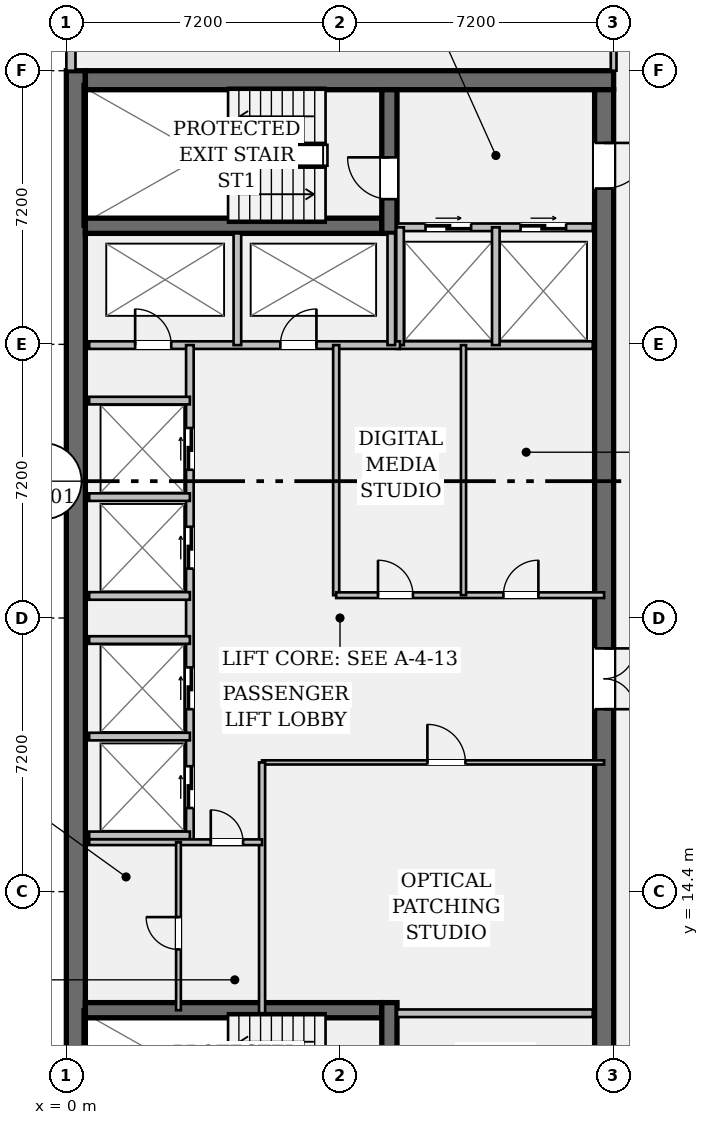
"""IFC4 building model, lengths in metres.
Left out: names, types, materials, properties, quantities, classifications, styles, units other than length and angle.
Written with IfcOpenShell. Run it as: python <this file> out.ifc"""

import sys

from ifc_helpers import new_model, si_unit, direction, frame, frame_2d, origin, place, context, subcontext, project, spatial, rectangle, extrude, element, fill, save


model = new_model("IFC4")
c1 = context("Model", 3, precision=1e-05, world=origin(), true_north=direction((0.0, 1.0)))
c2 = subcontext(c1, "Body", "Model", "MODEL_VIEW")
j1 = project(units=[si_unit("LENGTHUNIT", "METRE"), si_unit("PLANEANGLEUNIT", "RADIAN")], contexts=[c1])
p1 = place(None, origin())
s1 = spatial("IfcSite", under=j1, at=p1, CompositionType="ELEMENT")
p2 = place(p1, origin())
s2 = spatial("IfcBuilding", under=s1, at=p2, CompositionType="ELEMENT")
p3 = place(p2, frame((0.0, 0.0, 272.65)))
s3 = spatial("IfcBuildingStorey", under=s2, at=p3, CompositionType="ELEMENT", Elevation=272.65)
p4 = place(p3, frame((0.25, 7.2, 0.0), z_axis=(0.0, 0.0, 1.0), x_axis=(0.0, 1.0, 0.0)))
e1 = element("IfcWall", 1, at=p4, inside=s3, PredefinedType="SHEAR", context=c2, shape_type="SweptSolid", body=[
    extrude(rectangle(XDim=28.8, YDim=0.5, at=frame_2d((14.4, 0.0))), origin(), (0.0, 0.0, 1.0), 3.24),
])
p5 = place(p3, frame((0.5, 35.75, 0.0), z_axis=(0.0, 0.0, 1.0), x_axis=(1.0, 0.0, 0.0)))
e2 = element("IfcWall", 2, at=p5, inside=s3, PredefinedType="SHEAR", context=c2, shape_type="SweptSolid", body=[
    extrude(rectangle(XDim=13.9, YDim=0.5, at=frame_2d((6.95, 0.0))), origin(), (0.0, 0.0, 1.0), 3.24),
])
p6 = place(p3, frame((14.15, 35.5, 0.0), z_axis=(0.0, 0.0, 1.0), x_axis=(0.0, -1.0, 0.0)))
e3 = element("IfcWall", 3, at=p6, inside=s3, PredefinedType="SHEAR", context=c2, shape_type="SweptSolid", body=[
    extrude(rectangle(XDim=27.8, YDim=0.5, at=frame_2d((13.9, 0.0))), origin(), (0.0, 0.0, 1.0), 3.24),
])
p7 = place(p6, frame((1.4, 0.0, 0.0)))
e4 = element("IfcOpeningElement", 4, at=p7, cuts=e3, PredefinedType="OPENING", context=c2, shape_type="SweptSolid", body=[
    extrude(rectangle(XDim=1.2, YDim=2.15, at=frame_2d((0.6, 1.075))), frame((0.0, 0.262, 0.0), z_axis=(0.0, -1.0, 0.0), x_axis=(1.0, 0.0, 0.0)), (0.0, 0.0, 1.0), 0.524),
])
p8 = place(p6, frame((25.35, 0.0, 0.0)))
e5 = element("IfcOpeningElement", 5, at=p8, cuts=e3, PredefinedType="OPENING", context=c2, shape_type="SweptSolid", body=[
    extrude(rectangle(XDim=1.2, YDim=2.15, at=frame_2d((0.6, 1.075))), frame((0.0, 0.262, 0.0), z_axis=(0.0, -1.0, 0.0), x_axis=(1.0, 0.0, 0.0)), (0.0, 0.0, 1.0), 0.524),
])
p9 = place(p6, frame((14.7, 0.0, 0.0)))
e6 = element("IfcOpeningElement", 6, at=p9, cuts=e3, PredefinedType="OPENING", context=c2, shape_type="SweptSolid", body=[
    extrude(rectangle(XDim=1.6, YDim=2.2, at=frame_2d((0.8, 1.1))), frame((0.0, 0.262, 0.0), z_axis=(0.0, -1.0, 0.0), x_axis=(1.0, 0.0, 0.0)), (0.0, 0.0, 1.0), 0.524),
])
for number, where, z_axis, x_axis in (
    (7, (0.5, 31.92, 0.0), (0.0, 0.0, 1.0), (1.0, 0.0, 0.0)),
    (8, (0.5, 11.28, 0.0), (0.0, 0.0, 1.0), (1.0, 0.0, 0.0)),
):
    element("IfcWall", number, at=place(p3, frame(where, z_axis=z_axis, x_axis=x_axis)), inside=s3, PredefinedType="SHEAR", context=c2, shape_type="SweptSolid", body=[
        extrude(rectangle(XDim=7.8, YDim=0.4, at=frame_2d((3.9, 0.0))), origin(), (0.0, 0.0, 1.0), 3.24),
    ])
p10 = place(p3, frame((8.5, 31.72, 0.0), z_axis=(0.0, 0.0, 1.0), x_axis=(0.0, 1.0, 0.0)))
e9 = element("IfcWall", 9, at=p10, inside=s3, PredefinedType="SHEAR", context=c2, shape_type="SweptSolid", body=[
    extrude(rectangle(XDim=3.78, YDim=0.4, at=frame_2d((1.89, 0.0))), origin(), (0.0, 0.0, 1.0), 3.24),
])
p11 = place(p10, frame((0.9, 0.0, 0.0)))
e10 = element("IfcOpeningElement", 10, at=p11, cuts=e9, PredefinedType="OPENING", context=c2, shape_type="SweptSolid", body=[
    extrude(rectangle(XDim=1.1, YDim=2.15, at=frame_2d((0.55, 1.075))), frame((0.0, 0.212, 0.0), z_axis=(0.0, -1.0, 0.0), x_axis=(1.0, 0.0, 0.0)), (0.0, 0.0, 1.0), 0.424),
])
p12 = place(p3, frame((8.5, 7.7, 0.0), z_axis=(0.0, 0.0, 1.0), x_axis=(0.0, 1.0, 0.0)))
e11 = element("IfcWall", 11, at=p12, inside=s3, PredefinedType="SHEAR", context=c2, shape_type="SweptSolid", body=[
    extrude(rectangle(XDim=3.78, YDim=0.4, at=frame_2d((1.89, 0.0))), origin(), (0.0, 0.0, 1.0), 3.24),
])
p13 = place(p12, frame((0.85, 0.0, 0.0)))
e12 = element("IfcOpeningElement", 12, at=p13, cuts=e11, PredefinedType="OPENING", context=c2, shape_type="SweptSolid", body=[
    extrude(rectangle(XDim=1.1, YDim=2.15, at=frame_2d((0.55, 1.075))), frame((0.0, 0.212, 0.0), z_axis=(0.0, -1.0, 0.0), x_axis=(1.0, 0.0, 0.0)), (0.0, 0.0, 1.0), 0.424),
])
p14 = place(p3, frame((0.12, 36.0, 0.0), z_axis=(0.0, 0.0, 1.0), x_axis=(0.0, 1.0, 0.0)))
e13 = element("IfcWall", 13, at=p14, inside=s3, PredefinedType="STANDARD", context=c2, shape_type="SweptSolid", body=[
    extrude(rectangle(XDim=1.25, YDim=0.24, at=frame_2d((0.625, 0.0))), origin(), (0.0, 0.0, 1.0), 3.24),
])
p15 = place(p3, frame((8.7, 31.88, 0.0), z_axis=(0.0, 0.0, 1.0), x_axis=(1.0, 0.0, 0.0)))
e14 = element("IfcWall", 14, at=p15, inside=s3, PredefinedType="PARTITIONING", context=c2, shape_type="SweptSolid", body=[
    extrude(rectangle(XDim=5.15, YDim=0.2, at=frame_2d((2.575, 0.0))), origin(), (0.0, 0.0, 1.0), 3.24),
])
p16 = place(p15, frame((0.75, 0.0, 0.0)))
e15 = element("IfcOpeningElement", 15, at=p16, cuts=e14, PredefinedType="OPENING", context=c2, shape_type="SweptSolid", body=[
    extrude(rectangle(XDim=1.2, YDim=2.2, at=frame_2d((0.6, 1.1))), frame((0.0, 0.112, 0.0), z_axis=(0.0, -1.0, 0.0), x_axis=(1.0, 0.0, 0.0)), (0.0, 0.0, 1.0), 0.224),
])
p17 = place(p15, frame((3.25, 0.0, 0.0)))
e16 = element("IfcOpeningElement", 16, at=p17, cuts=e14, PredefinedType="OPENING", context=c2, shape_type="SweptSolid", body=[
    extrude(rectangle(XDim=1.2, YDim=2.2, at=frame_2d((0.6, 1.1))), frame((0.0, 0.112, 0.0), z_axis=(0.0, -1.0, 0.0), x_axis=(1.0, 0.0, 0.0)), (0.0, 0.0, 1.0), 0.224),
])
for number, where, z_axis, x_axis in (
    (17, (8.7, 11.2, 0.0), (0.0, 0.0, 1.0), (1.0, 0.0, 0.0)),
    (18, (8.7, 28.78, 0.0), (0.0, 0.0, 1.0), (1.0, 0.0, 0.0)),
):
    element("IfcWall", number, at=place(p3, frame(where, z_axis=z_axis, x_axis=x_axis)), inside=s3, PredefinedType="PARTITIONING", context=c2, shape_type="SweptSolid", body=[
        extrude(rectangle(XDim=5.15, YDim=0.2, at=frame_2d((2.575, 0.0))), origin(), (0.0, 0.0, 1.0), 3.24),
    ])
for number, where, z_axis, x_axis in (
    (19, (8.78, 28.78, 0.0), (0.0, 0.0, 1.0), (0.0, 1.0, 0.0)),
    (20, (11.3, 28.78, 0.0), (0.0, 0.0, 1.0), (0.0, 1.0, 0.0)),
):
    element("IfcWall", number, at=place(p3, frame(where, z_axis=z_axis, x_axis=x_axis)), inside=s3, PredefinedType="PARTITIONING", context=c2, shape_type="SweptSolid", body=[
        extrude(rectangle(XDim=3.1, YDim=0.2, at=frame_2d((1.55, 0.0))), origin(), (0.0, 0.0, 1.0), 3.24),
    ])
p18 = place(p3, frame((0.6, 28.78, 0.0), z_axis=(0.0, 0.0, 1.0), x_axis=(1.0, 0.0, 0.0)))
e21 = element("IfcWall", 21, at=p18, inside=s3, PredefinedType="PARTITIONING", context=c2, shape_type="SweptSolid", body=[
    extrude(rectangle(XDim=8.18, YDim=0.2, at=frame_2d((4.09, 0.0))), origin(), (0.0, 0.0, 1.0), 3.24),
])
p19 = place(p18, frame((1.21, 0.0, 0.0)))
e22 = element("IfcOpeningElement", 22, at=p19, cuts=e21, PredefinedType="OPENING", context=c2, shape_type="SweptSolid", body=[
    extrude(rectangle(XDim=0.95, YDim=2.15, at=frame_2d((0.475, 1.075))), frame((0.0, 0.112, 0.0), z_axis=(0.0, -1.0, 0.0), x_axis=(1.0, 0.0, 0.0)), (0.0, 0.0, 1.0), 0.224),
])
p20 = place(p18, frame((5.03, 0.0, 0.0)))
e23 = element("IfcOpeningElement", 23, at=p20, cuts=e21, PredefinedType="OPENING", context=c2, shape_type="SweptSolid", body=[
    extrude(rectangle(XDim=0.95, YDim=2.15, at=frame_2d((0.475, 1.075))), frame((0.0, 0.112, 0.0), z_axis=(0.0, -1.0, 0.0), x_axis=(1.0, 0.0, 0.0)), (0.0, 0.0, 1.0), 0.224),
])
for number, where, z_axis, x_axis in (
    (24, (4.5, 28.78, 0.0), (0.0, 0.0, 1.0), (0.0, 1.0, 0.0)),
    (25, (8.55, 28.78, 0.0), (0.0, 0.0, 1.0), (0.0, 1.0, 0.0)),
):
    element("IfcWall", number, at=place(p3, frame(where, z_axis=z_axis, x_axis=x_axis)), inside=s3, PredefinedType="PARTITIONING", context=c2, shape_type="SweptSolid", body=[
        extrude(rectangle(XDim=2.94, YDim=0.2, at=frame_2d((1.47, 0.0))), origin(), (0.0, 0.0, 1.0), 3.24),
    ])
p21 = place(p3, frame((3.25, 15.7, 0.0), z_axis=(0.0, 0.0, 1.0), x_axis=(0.0, 1.0, 0.0)))
e26 = element("IfcWall", 26, at=p21, inside=s3, PredefinedType="PARTITIONING", context=c2, shape_type="SweptSolid", body=[
    extrude(rectangle(XDim=13.08, YDim=0.2, at=frame_2d((6.54, 0.0))), origin(), (0.0, 0.0, 1.0), 3.24),
])
p22 = place(p21, frame((0.9, 0.0, 0.0)))
e27 = element("IfcOpeningElement", 27, at=p22, cuts=e26, PredefinedType="OPENING", context=c2, shape_type="SweptSolid", body=[
    extrude(rectangle(XDim=1.1, YDim=2.2, at=frame_2d((0.55, 1.1))), frame((0.0, 0.112, 0.0), z_axis=(0.0, -1.0, 0.0), x_axis=(1.0, 0.0, 0.0)), (0.0, 0.0, 1.0), 0.224),
])
p23 = place(p21, frame((3.5, 0.0, 0.0)))
e28 = element("IfcOpeningElement", 28, at=p23, cuts=e26, PredefinedType="OPENING", context=c2, shape_type="SweptSolid", body=[
    extrude(rectangle(XDim=1.1, YDim=2.2, at=frame_2d((0.55, 1.1))), frame((0.0, 0.112, 0.0), z_axis=(0.0, -1.0, 0.0), x_axis=(1.0, 0.0, 0.0)), (0.0, 0.0, 1.0), 0.224),
])
p24 = place(p21, frame((7.2, 0.0, 0.0)))
e29 = element("IfcOpeningElement", 29, at=p24, cuts=e26, PredefinedType="OPENING", context=c2, shape_type="SweptSolid", body=[
    extrude(rectangle(XDim=1.1, YDim=2.2, at=frame_2d((0.55, 1.1))), frame((0.0, 0.112, 0.0), z_axis=(0.0, -1.0, 0.0), x_axis=(1.0, 0.0, 0.0)), (0.0, 0.0, 1.0), 0.224),
])
p25 = place(p21, frame((9.8, 0.0, 0.0)))
e30 = element("IfcOpeningElement", 30, at=p25, cuts=e26, PredefinedType="OPENING", context=c2, shape_type="SweptSolid", body=[
    extrude(rectangle(XDim=1.1, YDim=2.2, at=frame_2d((0.55, 1.1))), frame((0.0, 0.112, 0.0), z_axis=(0.0, -1.0, 0.0), x_axis=(1.0, 0.0, 0.0)), (0.0, 0.0, 1.0), 0.224),
])
for number, where, z_axis, x_axis in (
    (31, (0.6, 15.88, 0.0), (0.0, 0.0, 1.0), (1.0, 0.0, 0.0)),
    (32, (0.6, 18.48, 0.0), (0.0, 0.0, 1.0), (1.0, 0.0, 0.0)),
    (33, (0.6, 22.18, 0.0), (0.0, 0.0, 1.0), (1.0, 0.0, 0.0)),
    (34, (0.6, 24.78, 0.0), (0.0, 0.0, 1.0), (1.0, 0.0, 0.0)),
    (35, (0.6, 21.02, 0.0), (0.0, 0.0, 1.0), (1.0, 0.0, 0.0)),
    (36, (0.6, 27.32, 0.0), (0.0, 0.0, 1.0), (1.0, 0.0, 0.0)),
):
    element("IfcWall", number, at=place(p3, frame(where, z_axis=z_axis, x_axis=x_axis)), inside=s3, PredefinedType="PARTITIONING", context=c2, shape_type="SweptSolid", body=[
        extrude(rectangle(XDim=2.65, YDim=0.2, at=frame_2d((1.325, 0.0))), origin(), (0.0, 0.0, 1.0), 3.24),
    ])
p26 = place(p3, frame((7.1, 22.2, 0.0), z_axis=(0.0, 0.0, 1.0), x_axis=(0.0, 1.0, 0.0)))
e37 = element("IfcWall", 37, at=p26, inside=s3, PredefinedType="PARTITIONING", context=c2, shape_type="SweptSolid", body=[
    extrude(rectangle(XDim=6.58, YDim=0.16, at=frame_2d((3.29, 0.0))), origin(), (0.0, 0.0, 1.0), 3.24),
])
p27 = place(p3, frame((7.1, 22.2, 0.0), z_axis=(0.0, 0.0, 1.0), x_axis=(1.0, 0.0, 0.0)))
e38 = element("IfcWall", 38, at=p27, inside=s3, PredefinedType="PARTITIONING", context=c2, shape_type="SweptSolid", body=[
    extrude(rectangle(XDim=7.05, YDim=0.15, at=frame_2d((3.525, 0.0))), origin(), (0.0, 0.0, 1.0), 3.24),
])
p28 = place(p27, frame((1.1, 0.0, 0.0)))
e39 = element("IfcOpeningElement", 39, at=p28, cuts=e38, PredefinedType="OPENING", context=c2, shape_type="SweptSolid", body=[
    extrude(rectangle(XDim=0.92, YDim=2.15, at=frame_2d((0.46, 1.075))), frame((0.0, 0.087, 0.0), z_axis=(0.0, -1.0, 0.0), x_axis=(1.0, 0.0, 0.0)), (0.0, 0.0, 1.0), 0.174),
])
p29 = place(p27, frame((4.4, 0.0, 0.0)))
e40 = element("IfcOpeningElement", 40, at=p29, cuts=e38, PredefinedType="OPENING", context=c2, shape_type="SweptSolid", body=[
    extrude(rectangle(XDim=0.92, YDim=2.15, at=frame_2d((0.46, 1.075))), frame((0.0, 0.087, 0.0), z_axis=(0.0, -1.0, 0.0), x_axis=(1.0, 0.0, 0.0)), (0.0, 0.0, 1.0), 0.174),
])
p30 = place(p3, frame((10.45, 22.2, 0.0), z_axis=(0.0, 0.0, 1.0), x_axis=(0.0, 1.0, 0.0)))
e41 = element("IfcWall", 41, at=p30, inside=s3, PredefinedType="PARTITIONING", context=c2, shape_type="SweptSolid", body=[
    extrude(rectangle(XDim=6.58, YDim=0.135, at=frame_2d((3.29, 0.0))), origin(), (0.0, 0.0, 1.0), 3.24),
])
p31 = place(p3, frame((5.15, 17.8, 0.0), z_axis=(0.0, 0.0, 1.0), x_axis=(1.0, 0.0, 0.0)))
e42 = element("IfcWall", 42, at=p31, inside=s3, PredefinedType="PARTITIONING", context=c2, shape_type="SweptSolid", body=[
    extrude(rectangle(XDim=9.0, YDim=0.11, at=frame_2d((4.5, 0.0))), origin(), (0.0, 0.0, 1.0), 3.24),
])
p32 = place(p31, frame((4.35, 0.0, 0.0)))
e43 = element("IfcOpeningElement", 43, at=p32, cuts=e42, PredefinedType="OPENING", context=c2, shape_type="SweptSolid", body=[
    extrude(rectangle(XDim=1.0, YDim=2.15, at=frame_2d((0.5, 1.075))), frame((0.0, 0.067, 0.0), z_axis=(0.0, -1.0, 0.0), x_axis=(1.0, 0.0, 0.0)), (0.0, 0.0, 1.0), 0.134),
])
p33 = place(p3, frame((5.15, 11.2, 0.0), z_axis=(0.0, 0.0, 1.0), x_axis=(0.0, 1.0, 0.0)))
e44 = element("IfcWall", 44, at=p33, inside=s3, PredefinedType="PARTITIONING", context=c2, shape_type="SweptSolid", body=[
    extrude(rectangle(XDim=6.6, YDim=0.16, at=frame_2d((3.3, 0.0))), origin(), (0.0, 0.0, 1.0), 3.24),
])
p34 = place(p3, frame((0.6, 15.7, 0.0), z_axis=(0.0, 0.0, 1.0), x_axis=(1.0, 0.0, 0.0)))
e45 = element("IfcWall", 45, at=p34, inside=s3, PredefinedType="PARTITIONING", context=c2, shape_type="SweptSolid", body=[
    extrude(rectangle(XDim=4.55, YDim=0.15, at=frame_2d((2.275, 0.0))), origin(), (0.0, 0.0, 1.0), 3.24),
])
p35 = place(p34, frame((3.2, 0.0, 0.0)))
e46 = element("IfcOpeningElement", 46, at=p35, cuts=e45, PredefinedType="OPENING", context=c2, shape_type="SweptSolid", body=[
    extrude(rectangle(XDim=0.85, YDim=2.15, at=frame_2d((0.425, 1.075))), frame((0.0, 0.087, 0.0), z_axis=(0.0, -1.0, 0.0), x_axis=(1.0, 0.0, 0.0)), (0.0, 0.0, 1.0), 0.174),
])
p36 = place(p3, frame((2.95, 11.28, 0.0), z_axis=(0.0, 0.0, 1.0), x_axis=(0.0, 1.0, 0.0)))
e47 = element("IfcWall", 47, at=p36, inside=s3, PredefinedType="PARTITIONING", context=c2, shape_type="SweptSolid", body=[
    extrude(rectangle(XDim=4.42, YDim=0.125, at=frame_2d((2.21, 0.0))), origin(), (0.0, 0.0, 1.0), 3.24),
])
p37 = place(p36, frame((1.6, 0.0, 0.0)))
e48 = element("IfcOpeningElement", 48, at=p37, cuts=e47, PredefinedType="OPENING", context=c2, shape_type="SweptSolid", body=[
    extrude(rectangle(XDim=0.85, YDim=2.15, at=frame_2d((0.425, 1.075))), frame((0.0, 0.074, 0.0), z_axis=(0.0, -1.0, 0.0), x_axis=(1.0, 0.0, 0.0)), (0.0, 0.0, 1.0), 0.149),
])
p38 = place(p3, frame((14.4, 36.0, 0.0), z_axis=(0.0, 0.0, 1.0), x_axis=(0.0, 1.0, 0.0)))
e49 = element("IfcWall", 49, at=p38, inside=s3, PredefinedType="PARTITIONING", context=c2, shape_type="SweptSolid", body=[
    extrude(rectangle(XDim=3.88, YDim=0.15, at=frame_2d((1.94, 0.0))), origin(), (0.0, 0.0, 1.0), 2.676),
])
p39 = place(p38, frame((0.65, 0.0, 0.0)))
e50 = element("IfcOpeningElement", 50, at=p39, cuts=e49, PredefinedType="OPENING", context=c2, shape_type="SweptSolid", body=[
    extrude(rectangle(XDim=0.9, YDim=2.15, at=frame_2d((0.45, 1.075))), frame((0.0, 0.087, 0.0), z_axis=(0.0, -1.0, 0.0), x_axis=(1.0, 0.0, 0.0)), (0.0, 0.0, 1.0), 0.174),
])
p40 = place(p11, origin())
e51 = element("IfcDoor", 51, at=p40, inside=s3, OperationType="SINGLE_SWING_RIGHT", PredefinedType="DOOR", context=c2, shape_type="SweptSolid", body=[
    extrude(rectangle(XDim=1.1, YDim=2.15, at=frame_2d((0.55, 1.075))), frame((0.0, 0.025, 0.0), z_axis=(0.0, -1.0, 0.0), x_axis=(1.0, 0.0, 0.0)), (0.0, 0.0, 1.0), 0.05),
])
fill(e10, e51)
p41 = place(p7, origin())
e52 = element("IfcDoor", 52, at=p41, inside=s3, OperationType="SINGLE_SWING_LEFT", PredefinedType="DOOR", context=c2, shape_type="SweptSolid", body=[
    extrude(rectangle(XDim=1.2, YDim=2.15, at=frame_2d((0.6, 1.075))), frame((0.0, 0.025, 0.0), z_axis=(0.0, -1.0, 0.0), x_axis=(1.0, 0.0, 0.0)), (0.0, 0.0, 1.0), 0.05),
])
fill(e4, e52)
p42 = place(p16, origin())
e53 = element("IfcDoor", 53, at=p42, inside=s3, OperationType="DOUBLE_DOOR_SLIDING", PredefinedType="DOOR", context=c2, shape_type="SweptSolid", body=[
    extrude(rectangle(XDim=1.2, YDim=2.2, at=frame_2d((0.6, 1.1))), frame((0.0, 0.025, 0.0), z_axis=(0.0, -1.0, 0.0), x_axis=(1.0, 0.0, 0.0)), (0.0, 0.0, 1.0), 0.05),
])
fill(e15, e53)
p43 = place(p17, origin())
e54 = element("IfcDoor", 54, at=p43, inside=s3, OperationType="DOUBLE_DOOR_SLIDING", PredefinedType="DOOR", context=c2, shape_type="SweptSolid", body=[
    extrude(rectangle(XDim=1.2, YDim=2.2, at=frame_2d((0.6, 1.1))), frame((0.0, 0.025, 0.0), z_axis=(0.0, -1.0, 0.0), x_axis=(1.0, 0.0, 0.0)), (0.0, 0.0, 1.0), 0.05),
])
fill(e16, e54)
p44 = place(p19, origin())
e55 = element("IfcDoor", 55, at=p44, inside=s3, OperationType="SINGLE_SWING_LEFT", PredefinedType="DOOR", context=c2, shape_type="SweptSolid", body=[
    extrude(rectangle(XDim=0.95, YDim=2.15, at=frame_2d((0.475, 1.075))), frame((0.0, 0.025, 0.0), z_axis=(0.0, -1.0, 0.0), x_axis=(1.0, 0.0, 0.0)), (0.0, 0.0, 1.0), 0.05),
])
fill(e22, e55)
p45 = place(p20, origin())
e56 = element("IfcDoor", 56, at=p45, inside=s3, OperationType="SINGLE_SWING_RIGHT", PredefinedType="DOOR", context=c2, shape_type="SweptSolid", body=[
    extrude(rectangle(XDim=0.95, YDim=2.15, at=frame_2d((0.475, 1.075))), frame((0.0, 0.025, 0.0), z_axis=(0.0, -1.0, 0.0), x_axis=(1.0, 0.0, 0.0)), (0.0, 0.0, 1.0), 0.05),
])
fill(e23, e56)
p46 = place(p9, origin())
e57 = element("IfcDoor", 57, at=p46, inside=s3, OperationType="DOUBLE_DOOR_SINGLE_SWING", PredefinedType="DOOR", context=c2, shape_type="SweptSolid", body=[
    extrude(rectangle(XDim=1.6, YDim=2.2, at=frame_2d((0.8, 1.1))), frame((0.0, 0.025, 0.0), z_axis=(0.0, -1.0, 0.0), x_axis=(1.0, 0.0, 0.0)), (0.0, 0.0, 1.0), 0.05),
])
fill(e6, e57)
p47 = place(p22, origin())
e58 = element("IfcDoor", 58, at=p47, inside=s3, OperationType="DOUBLE_DOOR_SLIDING", PredefinedType="DOOR", context=c2, shape_type="SweptSolid", body=[
    extrude(rectangle(XDim=1.1, YDim=2.2, at=frame_2d((0.55, 1.1))), frame((0.0, 0.025, 0.0), z_axis=(0.0, -1.0, 0.0), x_axis=(1.0, 0.0, 0.0)), (0.0, 0.0, 1.0), 0.05),
])
fill(e27, e58)
p48 = place(p23, origin())
e59 = element("IfcDoor", 59, at=p48, inside=s3, OperationType="DOUBLE_DOOR_SLIDING", PredefinedType="DOOR", context=c2, shape_type="SweptSolid", body=[
    extrude(rectangle(XDim=1.1, YDim=2.2, at=frame_2d((0.55, 1.1))), frame((0.0, 0.025, 0.0), z_axis=(0.0, -1.0, 0.0), x_axis=(1.0, 0.0, 0.0)), (0.0, 0.0, 1.0), 0.05),
])
fill(e28, e59)
p49 = place(p24, origin())
e60 = element("IfcDoor", 60, at=p49, inside=s3, OperationType="DOUBLE_DOOR_SLIDING", PredefinedType="DOOR", context=c2, shape_type="SweptSolid", body=[
    extrude(rectangle(XDim=1.1, YDim=2.2, at=frame_2d((0.55, 1.1))), frame((0.0, 0.025, 0.0), z_axis=(0.0, -1.0, 0.0), x_axis=(1.0, 0.0, 0.0)), (0.0, 0.0, 1.0), 0.05),
])
fill(e29, e60)
p50 = place(p25, origin())
e61 = element("IfcDoor", 61, at=p50, inside=s3, OperationType="DOUBLE_DOOR_SLIDING", PredefinedType="DOOR", context=c2, shape_type="SweptSolid", body=[
    extrude(rectangle(XDim=1.1, YDim=2.2, at=frame_2d((0.55, 1.1))), frame((0.0, 0.025, 0.0), z_axis=(0.0, -1.0, 0.0), x_axis=(1.0, 0.0, 0.0)), (0.0, 0.0, 1.0), 0.05),
])
fill(e30, e61)
p51 = place(p28, origin())
e62 = element("IfcDoor", 62, at=p51, inside=s3, OperationType="SINGLE_SWING_LEFT", PredefinedType="DOOR", context=c2, shape_type="SweptSolid", body=[
    extrude(rectangle(XDim=0.92, YDim=2.15, at=frame_2d((0.46, 1.075))), frame((0.0, 0.025, 0.0), z_axis=(0.0, -1.0, 0.0), x_axis=(1.0, 0.0, 0.0)), (0.0, 0.0, 1.0), 0.05),
])
fill(e39, e62)
p52 = place(p29, origin())
e63 = element("IfcDoor", 63, at=p52, inside=s3, OperationType="SINGLE_SWING_RIGHT", PredefinedType="DOOR", context=c2, shape_type="SweptSolid", body=[
    extrude(rectangle(XDim=0.92, YDim=2.15, at=frame_2d((0.46, 1.075))), frame((0.0, 0.025, 0.0), z_axis=(0.0, -1.0, 0.0), x_axis=(1.0, 0.0, 0.0)), (0.0, 0.0, 1.0), 0.05),
])
fill(e40, e63)
p53 = place(p32, origin())
e64 = element("IfcDoor", 64, at=p53, inside=s3, OperationType="SINGLE_SWING_LEFT", PredefinedType="DOOR", context=c2, shape_type="SweptSolid", body=[
    extrude(rectangle(XDim=1.0, YDim=2.15, at=frame_2d((0.5, 1.075))), frame((0.0, 0.025, 0.0), z_axis=(0.0, -1.0, 0.0), x_axis=(1.0, 0.0, 0.0)), (0.0, 0.0, 1.0), 0.05),
])
fill(e43, e64)
p54 = place(p35, origin())
e65 = element("IfcDoor", 65, at=p54, inside=s3, OperationType="SINGLE_SWING_LEFT", PredefinedType="DOOR", context=c2, shape_type="SweptSolid", body=[
    extrude(rectangle(XDim=0.85, YDim=2.15, at=frame_2d((0.425, 1.075))), frame((0.0, 0.025, 0.0), z_axis=(0.0, -1.0, 0.0), x_axis=(1.0, 0.0, 0.0)), (0.0, 0.0, 1.0), 0.05),
])
fill(e46, e65)
p55 = place(p37, origin())
e66 = element("IfcDoor", 66, at=p55, inside=s3, OperationType="SINGLE_SWING_RIGHT", PredefinedType="DOOR", context=c2, shape_type="SweptSolid", body=[
    extrude(rectangle(XDim=0.85, YDim=2.15, at=frame_2d((0.425, 1.075))), frame((0.0, 0.025, 0.0), z_axis=(0.0, -1.0, 0.0), x_axis=(1.0, 0.0, 0.0)), (0.0, 0.0, 1.0), 0.05),
])
fill(e48, e66)
save(model, sys.argv[1])
